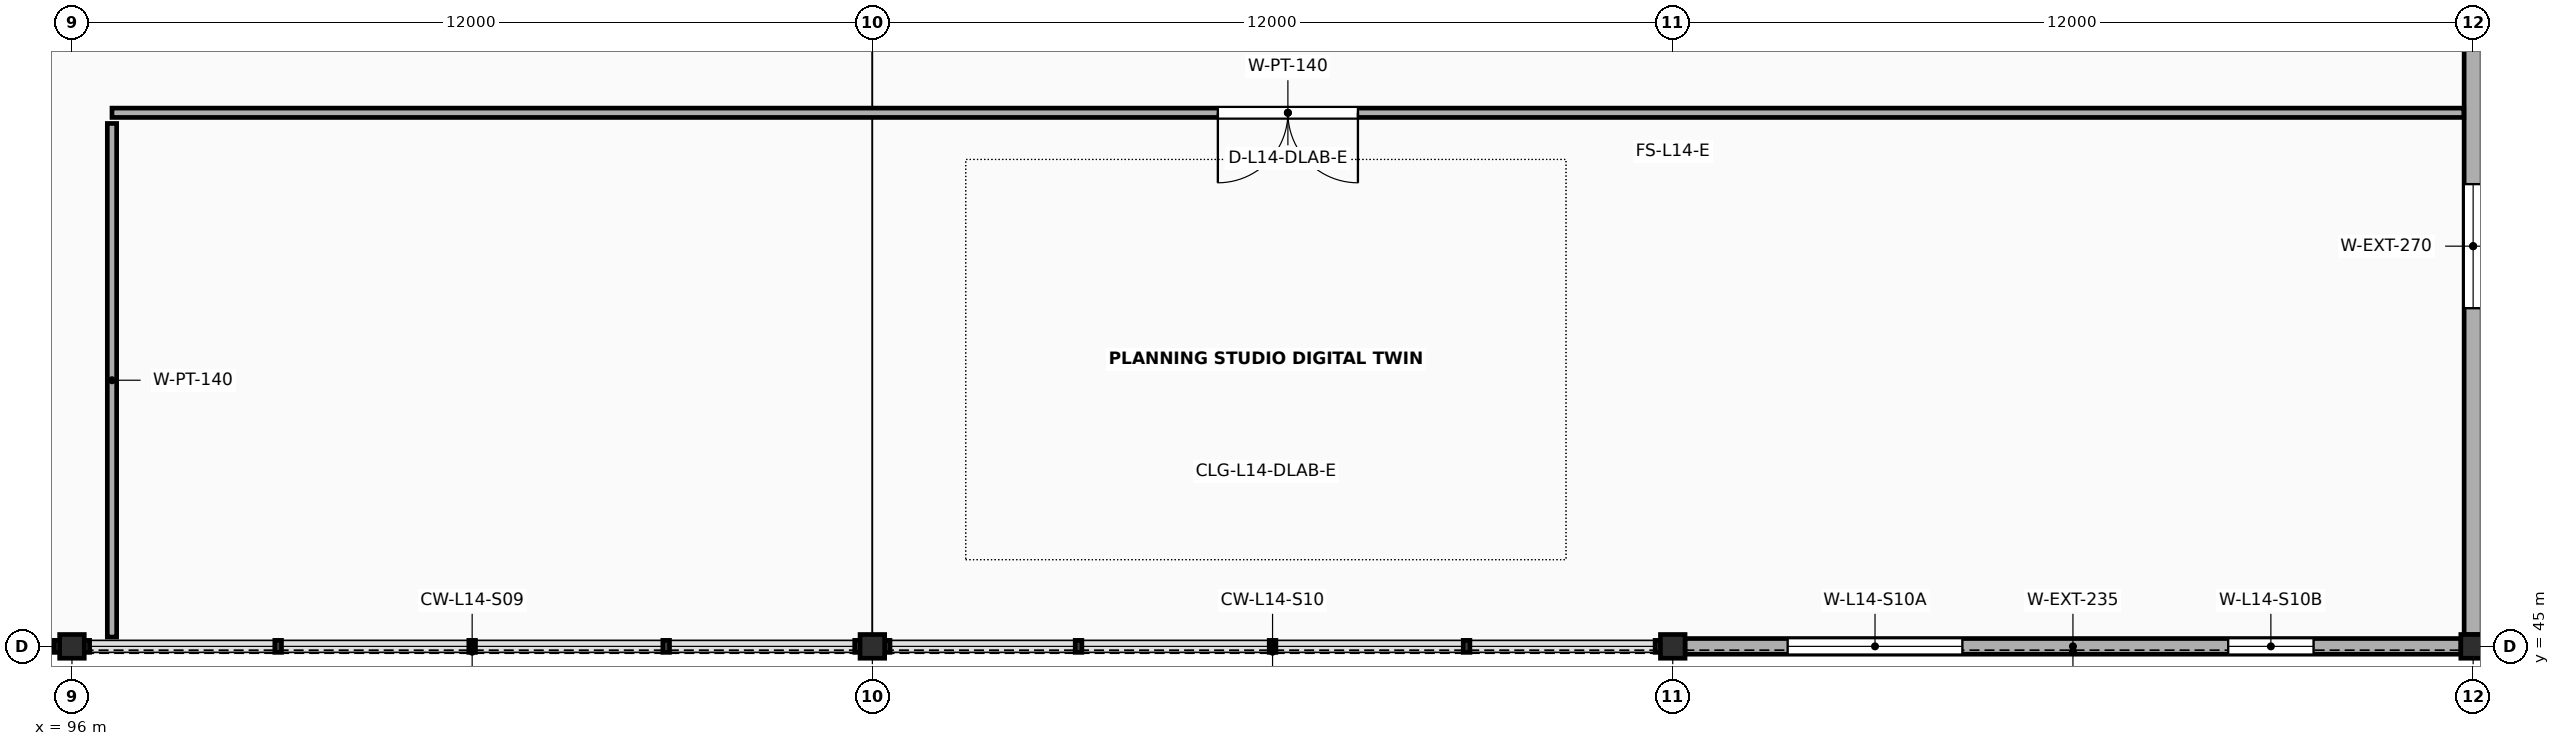
"""IFC4 building model, lengths in metres.
Left out: names, types, materials, properties, quantities, classifications, styles, units other than length and angle.
Written with IfcOpenShell. Run it as: python <this file> out.ifc"""

import sys

from ifc_helpers import new_model, si_unit, direction, frame, frame_2d, origin, origin_2d, place, context, subcontext, project, spatial, rectangle, i_section, extrude, element, fill, save


model = new_model("IFC4")
c1 = context("Model", 3, precision=1e-05, world=origin(), true_north=direction((0.0, 1.0)))
c2 = subcontext(c1, "Body", "Model", "MODEL_VIEW")
j1 = project(units=[si_unit("LENGTHUNIT", "METRE"), si_unit("PLANEANGLEUNIT", "RADIAN")], contexts=[c1])
p1 = place(None, origin())
s1 = spatial("IfcSite", under=j1, at=p1, CompositionType="ELEMENT")
p2 = place(p1, origin())
s2 = spatial("IfcBuilding", under=s1, at=p2, CompositionType="ELEMENT")
p3 = place(p2, frame((0.0, 0.0, 57.6)))
s3 = spatial("IfcBuildingStorey", under=s2, at=p3, CompositionType="ELEMENT", Elevation=57.6)
for number, where, z_axis, x_axis in (
    (1, (96.0, 45.0, 0.0), (0.0, 0.0, 1.0), (1.0, 0.0, 0.0)),
    (2, (108.0, 45.0, 0.0), (0.0, 0.0, 1.0), (1.0, 0.0, 0.0)),
    (3, (120.0, 45.0, 0.0), (0.0, 0.0, 1.0), (1.0, 0.0, 0.0)),
    (4, (132.0, 45.0, 0.0), (0.0, 0.0, 1.0), (1.0, 0.0, 0.0)),
):
    element("IfcColumn", number, at=place(p3, frame(where, z_axis=z_axis, x_axis=x_axis)), inside=s3, PredefinedType="COLUMN", context=c2, shape_type="SweptSolid", body=[
        extrude(i_section(OverallWidth=0.369, OverallDepth=0.356, WebThickness=0.011, FlangeThickness=0.018, FilletRadius=0.018, at=origin_2d()), origin(), (0.0, 0.0, 1.0), 4.0),
    ])
p4 = place(p3, frame((120.183, 45.0, 0.0), z_axis=(0.0, 0.0, 1.0), x_axis=(1.0, 0.0, 0.0)))
e5 = element("IfcWall", 5, at=p4, inside=s3, PredefinedType="SOLIDWALL", context=c2, shape_type="SweptSolid", body=[
    extrude(rectangle(XDim=11.635, YDim=0.235, at=frame_2d((5.817, 0.0))), origin(), (0.0, 0.0, 1.0), 3.216),
])
p5 = place(p4, frame((1.54, 0.0, 0.78)))
e6 = element("IfcOpeningElement", 6, at=p5, cuts=e5, PredefinedType="OPENING", context=c2, shape_type="SweptSolid", body=[
    extrude(rectangle(XDim=2.62, YDim=1.58, at=frame_2d((1.31, 0.79))), frame((0.0, 0.133, 0.0), z_axis=(0.0, -1.0, 0.0), x_axis=(1.0, 0.0, 0.0)), (0.0, 0.0, 1.0), 0.265),
])
p6 = place(p4, frame((8.145, 0.0, 0.78)))
e7 = element("IfcOpeningElement", 7, at=p6, cuts=e5, PredefinedType="OPENING", context=c2, shape_type="SweptSolid", body=[
    extrude(rectangle(XDim=1.28, YDim=1.74, at=frame_2d((0.64, 0.87))), frame((0.0, 0.133, 0.0), z_axis=(0.0, -1.0, 0.0), x_axis=(1.0, 0.0, 0.0)), (0.0, 0.0, 1.0), 0.265),
])
p7 = place(p3, frame((132.0, 45.176, 0.0), z_axis=(0.0, 0.0, 1.0), x_axis=(0.0, 1.0, 0.0)))
e8 = element("IfcWall", 8, at=p7, inside=s3, PredefinedType="SOLIDWALL", context=c2, shape_type="SweptSolid", body=[
    extrude(rectangle(XDim=11.648, YDim=0.27, at=frame_2d((5.824, 0.0))), origin(), (0.0, 0.0, 1.0), 3.216),
])
p8 = place(p7, frame((4.894, 0.0, 0.78)))
e9 = element("IfcOpeningElement", 9, at=p8, cuts=e8, PredefinedType="OPENING", context=c2, shape_type="SweptSolid", body=[
    extrude(rectangle(XDim=1.86, YDim=1.74, at=frame_2d((0.93, 0.87))), frame((0.0, 0.15, 0.0), z_axis=(0.0, -1.0, 0.0), x_axis=(1.0, 0.0, 0.0)), (0.0, 0.0, 1.0), 0.3),
])
p9 = place(p3, frame((96.6, 53.0, 0.0), z_axis=(0.0, 0.0, 1.0), x_axis=(1.0, 0.0, 0.0)))
e10 = element("IfcWall", 10, at=p9, inside=s3, PredefinedType="PARTITIONING", context=c2, shape_type="SweptSolid", body=[
    extrude(rectangle(XDim=35.26, YDim=0.14, at=frame_2d((17.63, 0.0))), origin(), (0.0, 0.0, 1.0), 2.88),
])
p10 = place(p9, frame((16.58, 0.0, 0.0)))
e11 = element("IfcOpeningElement", 11, at=p10, cuts=e10, PredefinedType="OPENING", context=c2, shape_type="SweptSolid", body=[
    extrude(rectangle(XDim=2.1, YDim=2.47, at=frame_2d((1.05, 1.235))), frame((0.0, 0.085, 0.0), z_axis=(0.0, -1.0, 0.0), x_axis=(1.0, 0.0, 0.0)), (0.0, 0.0, 1.0), 0.17),
])
p11 = place(p3, frame((96.6, 45.14, 0.0), z_axis=(0.0, 0.0, 1.0), x_axis=(0.0, 1.0, 0.0)))
e12 = element("IfcWall", 12, at=p11, inside=s3, PredefinedType="PARTITIONING", context=c2, shape_type="SweptSolid", body=[
    extrude(rectangle(XDim=7.7, YDim=0.14, at=frame_2d((3.85, 0.0))), origin(), (0.0, 0.0, 1.0), 2.88),
])
p12 = place(p5, origin())
e13 = element("IfcWindow", 13, at=p12, inside=s3, PartitioningType="DOUBLE_PANEL_VERTICAL", PredefinedType="WINDOW", context=c2, shape_type="SweptSolid", body=[
    extrude(rectangle(XDim=2.62, YDim=1.58, at=frame_2d((1.31, 0.79))), frame((0.0, 0.03, 0.0), z_axis=(0.0, -1.0, 0.0), x_axis=(1.0, 0.0, 0.0)), (0.0, 0.0, 1.0), 0.06),
])
fill(e6, e13)
p13 = place(p6, origin())
e14 = element("IfcWindow", 14, at=p13, inside=s3, PartitioningType="SINGLE_PANEL", PredefinedType="WINDOW", context=c2, shape_type="SweptSolid", body=[
    extrude(rectangle(XDim=1.28, YDim=1.74, at=frame_2d((0.64, 0.87))), frame((0.0, 0.03, 0.0), z_axis=(0.0, -1.0, 0.0), x_axis=(1.0, 0.0, 0.0)), (0.0, 0.0, 1.0), 0.06),
])
fill(e7, e14)
p14 = place(p8, origin())
e15 = element("IfcWindow", 15, at=p14, inside=s3, PartitioningType="DOUBLE_PANEL_VERTICAL", PredefinedType="WINDOW", context=c2, shape_type="SweptSolid", body=[
    extrude(rectangle(XDim=1.86, YDim=1.74, at=frame_2d((0.93, 0.87))), frame((0.0, 0.03, 0.0), z_axis=(0.0, -1.0, 0.0), x_axis=(1.0, 0.0, 0.0)), (0.0, 0.0, 1.0), 0.06),
])
fill(e9, e15)
p15 = place(p10, origin())
e16 = element("IfcDoor", 16, at=p15, inside=s3, OperationType="DOUBLE_DOOR_SINGLE_SWING", PredefinedType="DOOR", context=c2, shape_type="SweptSolid", body=[
    extrude(rectangle(XDim=2.1, YDim=2.47, at=frame_2d((1.05, 1.235))), frame((0.0, 0.025, 0.0), z_axis=(0.0, -1.0, 0.0), x_axis=(1.0, 0.0, 0.0)), (0.0, 0.0, 1.0), 0.05),
])
fill(e11, e16)
save(model, sys.argv[1])
